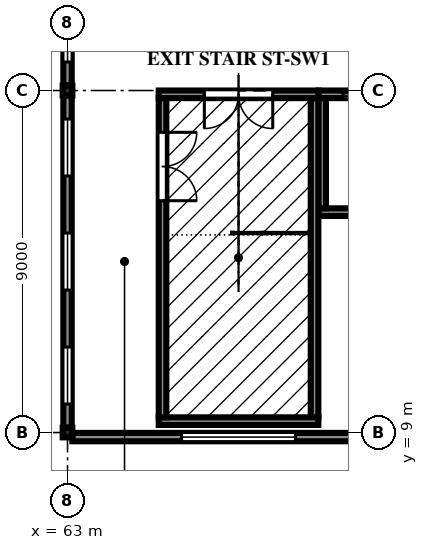
"""IFC4 building model, lengths in metres.
Left out: names, types, materials, properties, quantities, classifications, styles, units other than length and angle.
Written with IfcOpenShell. Run it as: python <this file> out.ifc"""

import sys

from ifc_helpers import new_model, si_unit, direction, frame, frame_2d, origin, origin_2d, place, context, subcontext, project, spatial, polyline, rectangle, i_section, outline, extrude, element, fill, save


model = new_model("IFC4")
c1 = context("Model", 3, precision=1e-05, world=origin(), true_north=direction((0.0, 1.0)))
c2 = subcontext(c1, "Body", "Model", "MODEL_VIEW")
j1 = project(units=[si_unit("LENGTHUNIT", "METRE"), si_unit("PLANEANGLEUNIT", "RADIAN")], contexts=[c1])
p1 = place(None, origin())
s1 = spatial("IfcSite", under=j1, at=p1, CompositionType="ELEMENT")
p2 = place(p1, origin())
s2 = spatial("IfcBuilding", under=s1, at=p2, CompositionType="ELEMENT")
p3 = place(p2, frame((0.0, 0.0, 7.5)))
s3 = spatial("IfcBuildingStorey", under=s2, at=p3, CompositionType="ELEMENT", Elevation=7.5)
p4 = place(p3, frame((63.0, 9.0, 0.0), z_axis=(0.0, 0.0, 1.0), x_axis=(1.0, 0.0, 0.0)))
e1 = element("IfcColumn", 1, at=p4, inside=s3, PredefinedType="COLUMN", context=c2, shape_type="SweptSolid", body=[
    extrude(i_section(OverallWidth=0.255, OverallDepth=0.254, WebThickness=0.009, FlangeThickness=0.014, FilletRadius=0.013, at=origin_2d()), origin(), (0.0, 0.0, 1.0), 4.2),
])
p5 = place(p3, frame((63.0, 18.0, 0.0), z_axis=(0.0, 0.0, 1.0), x_axis=(1.0, 0.0, 0.0)))
e2 = element("IfcColumn", 2, at=p5, inside=s3, PredefinedType="COLUMN", context=c2, shape_type="SweptSolid", body=[
    extrude(i_section(OverallWidth=0.256, OverallDepth=0.26, WebThickness=0.01, FlangeThickness=0.017, FilletRadius=0.013, at=origin_2d()), origin(), (0.0, 0.0, 1.0), 4.2),
])
p6 = place(p3, frame((63.127, 8.88, -0.13), z_axis=(0.0, 0.0, 1.0), x_axis=(1.0, 0.0, 0.0)))
e3 = element("IfcWall", 3, at=p6, inside=s3, PredefinedType="SOLIDWALL", context=c2, shape_type="SweptSolid", body=[
    extrude(rectangle(XDim=8.746, YDim=0.22, at=frame_2d((4.373, 0.0))), origin(), (0.0, 0.0, 1.0), 3.727),
])
p7 = place(p6, frame((2.873, 0.0, 1.03)))
e4 = element("IfcOpeningElement", 4, at=p7, cuts=e3, PredefinedType="OPENING", context=c2, shape_type="SweptSolid", body=[
    extrude(rectangle(XDim=3.0, YDim=2.1, at=frame_2d((1.5, 1.05))), frame((0.0, 0.12, 0.0), z_axis=(0.0, -1.0, 0.0), x_axis=(1.0, 0.0, 0.0)), (0.0, 0.0, 1.0), 0.24),
])
p8 = place(p3, frame((63.0, 9.127, 0.0), z_axis=(0.0, 0.0, 1.0), x_axis=(0.0, 1.0, 0.0)))
e5 = element("IfcWall", 5, at=p8, inside=s3, PredefinedType="SOLIDWALL", context=c2, shape_type="SweptSolid", body=[
    extrude(rectangle(XDim=8.743, YDim=0.22, at=frame_2d((4.372, 0.0))), origin(), (0.0, 0.0, 1.0), 3.597),
])
p9 = place(p8, frame((0.623, 0.0, 0.9)))
e6 = element("IfcOpeningElement", 6, at=p9, cuts=e5, PredefinedType="OPENING", context=c2, shape_type="SweptSolid", body=[
    extrude(rectangle(XDim=1.5, YDim=2.4, at=frame_2d((0.75, 1.2))), frame((0.0, 0.12, 0.0), z_axis=(0.0, -1.0, 0.0), x_axis=(1.0, 0.0, 0.0)), (0.0, 0.0, 1.0), 0.24),
])
p10 = place(p8, frame((3.623, 0.0, 0.9)))
e7 = element("IfcOpeningElement", 7, at=p10, cuts=e5, PredefinedType="OPENING", context=c2, shape_type="SweptSolid", body=[
    extrude(rectangle(XDim=1.5, YDim=2.4, at=frame_2d((0.75, 1.2))), frame((0.0, 0.12, 0.0), z_axis=(0.0, -1.0, 0.0), x_axis=(1.0, 0.0, 0.0)), (0.0, 0.0, 1.0), 0.24),
])
p11 = place(p8, frame((6.623, 0.0, 0.9)))
e8 = element("IfcOpeningElement", 8, at=p11, cuts=e5, PredefinedType="OPENING", context=c2, shape_type="SweptSolid", body=[
    extrude(rectangle(XDim=1.5, YDim=2.4, at=frame_2d((0.75, 1.2))), frame((0.0, 0.12, 0.0), z_axis=(0.0, -1.0, 0.0), x_axis=(1.0, 0.0, 0.0)), (0.0, 0.0, 1.0), 0.24),
])
p12 = place(p3, frame((63.0, 18.13, 0.0), z_axis=(0.0, 0.0, 1.0), x_axis=(0.0, 1.0, 0.0)))
e9 = element("IfcWall", 9, at=p12, inside=s3, PredefinedType="SOLIDWALL", context=c2, shape_type="SweptSolid", body=[
    extrude(rectangle(XDim=8.74, YDim=0.22, at=frame_2d((4.37, 0.0))), origin(), (0.0, 0.0, 1.0), 3.597),
])
p13 = place(p12, frame((0.62, 0.0, 0.9)))
e10 = element("IfcOpeningElement", 10, at=p13, cuts=e9, PredefinedType="OPENING", context=c2, shape_type="SweptSolid", body=[
    extrude(rectangle(XDim=1.5, YDim=2.4, at=frame_2d((0.75, 1.2))), frame((0.0, 0.12, 0.0), z_axis=(0.0, -1.0, 0.0), x_axis=(1.0, 0.0, 0.0)), (0.0, 0.0, 1.0), 0.24),
])
p14 = place(p12, frame((3.62, 0.0, 0.9)))
e11 = element("IfcOpeningElement", 11, at=p14, cuts=e9, PredefinedType="OPENING", context=c2, shape_type="SweptSolid", body=[
    extrude(rectangle(XDim=1.5, YDim=2.4, at=frame_2d((0.75, 1.2))), frame((0.0, 0.12, 0.0), z_axis=(0.0, -1.0, 0.0), x_axis=(1.0, 0.0, 0.0)), (0.0, 0.0, 1.0), 0.24),
])
p15 = place(p12, frame((6.62, 0.0, 0.9)))
e12 = element("IfcOpeningElement", 12, at=p15, cuts=e9, PredefinedType="OPENING", context=c2, shape_type="SweptSolid", body=[
    extrude(rectangle(XDim=1.5, YDim=2.4, at=frame_2d((0.75, 1.2))), frame((0.0, 0.12, 0.0), z_axis=(0.0, -1.0, 0.0), x_axis=(1.0, 0.0, 0.0)), (0.0, 0.0, 1.0), 0.24),
])
p16 = place(p3, frame((65.4, 9.3, 0.0), z_axis=(0.0, 0.0, 1.0), x_axis=(1.0, 0.0, 0.0)))
e13 = element("IfcWall", 13, at=p16, inside=s3, PredefinedType="SOLIDWALL", context=c2, shape_type="SweptSolid", body=[
    extrude(rectangle(XDim=4.2, YDim=0.2, at=frame_2d((2.1, 0.0))), origin(), (0.0, 0.0, 1.0), 3.59),
])
p17 = place(p3, frame((65.4, 17.9, -0.13), z_axis=(0.0, 0.0, 1.0), x_axis=(1.0, 0.0, 0.0)))
e14 = element("IfcWall", 14, at=p17, inside=s3, PredefinedType="SOLIDWALL", context=c2, shape_type="SweptSolid", body=[
    extrude(rectangle(XDim=4.2, YDim=0.2, at=frame_2d((2.1, 0.0))), origin(), (0.0, 0.0, 1.0), 3.72),
])
p18 = place(p17, frame((1.2, 0.0, 0.13)))
e15 = element("IfcOpeningElement", 15, at=p18, cuts=e14, PredefinedType="OPENING", context=c2, shape_type="SweptSolid", body=[
    extrude(rectangle(XDim=1.8, YDim=2.1, at=frame_2d((0.9, 1.05))), frame((0.0, 0.11, 0.0), z_axis=(0.0, -1.0, 0.0), x_axis=(1.0, 0.0, 0.0)), (0.0, 0.0, 1.0), 0.22),
])
p19 = place(p3, frame((65.5, 9.4, -0.13), z_axis=(0.0, 0.0, 1.0), x_axis=(0.0, 1.0, 0.0)))
e16 = element("IfcWall", 16, at=p19, inside=s3, PredefinedType="SOLIDWALL", context=c2, shape_type="SweptSolid", body=[
    extrude(rectangle(XDim=8.4, YDim=0.2, at=frame_2d((4.2, 0.0))), origin(), (0.0, 0.0, 1.0), 3.72),
])
p20 = place(p19, frame((5.7, 0.0, 0.13)))
e17 = element("IfcOpeningElement", 17, at=p20, cuts=e16, PredefinedType="OPENING", context=c2, shape_type="SweptSolid", body=[
    extrude(rectangle(XDim=1.8, YDim=2.1, at=frame_2d((0.9, 1.05))), frame((0.0, 0.11, 0.0), z_axis=(0.0, -1.0, 0.0), x_axis=(1.0, 0.0, 0.0)), (0.0, 0.0, 1.0), 0.22),
])
p21 = place(p3, frame((69.5, 9.4, -0.13), z_axis=(0.0, 0.0, 1.0), x_axis=(0.0, 1.0, 0.0)))
e18 = element("IfcWall", 18, at=p21, inside=s3, PredefinedType="SOLIDWALL", context=c2, shape_type="SweptSolid", body=[
    extrude(rectangle(XDim=8.4, YDim=0.2, at=frame_2d((4.2, 0.0))), origin(), (0.0, 0.0, 1.0), 3.72),
])
p22 = place(p3, frame((69.602, 14.8, 0.0), z_axis=(0.0, 0.0, 1.0), x_axis=(1.0, 0.0, 0.0)))
e19 = element("IfcWall", 19, at=p22, inside=s3, PredefinedType="SOLIDWALL", context=c2, shape_type="SweptSolid", body=[
    extrude(rectangle(XDim=2.398, YDim=0.2, at=frame_2d((1.199, 0.0))), origin(), (0.0, 0.0, 1.0), 3.516),
])
p23 = place(p3, frame((69.602, 17.9, 0.0), z_axis=(0.0, 0.0, 1.0), x_axis=(1.0, 0.0, 0.0)))
e20 = element("IfcWall", 20, at=p23, inside=s3, PredefinedType="SOLIDWALL", context=c2, shape_type="SweptSolid", body=[
    extrude(rectangle(XDim=2.398, YDim=0.2, at=frame_2d((1.199, 0.0))), origin(), (0.0, 0.0, 1.0), 3.516),
])
p24 = place(p23, frame((0.648, 0.0, 0.0)))
e21 = element("IfcOpeningElement", 21, at=p24, cuts=e20, PredefinedType="OPENING", context=c2, shape_type="SweptSolid", body=[
    extrude(rectangle(XDim=1.1, YDim=2.1, at=frame_2d((0.55, 1.05))), frame((0.0, 0.11, 0.0), z_axis=(0.0, -1.0, 0.0), x_axis=(1.0, 0.0, 0.0)), (0.0, 0.0, 1.0), 0.22),
])
p25 = place(p3, frame((69.7, 14.9, 0.0), z_axis=(0.0, 0.0, 1.0), x_axis=(0.0, 1.0, 0.0)))
e22 = element("IfcWall", 22, at=p25, inside=s3, PredefinedType="SOLIDWALL", context=c2, shape_type="SweptSolid", body=[
    extrude(rectangle(XDim=2.9, YDim=0.2, at=frame_2d((1.45, 0.0))), origin(), (0.0, 0.0, 1.0), 3.516),
])
p26 = place(p7, origin())
e23 = element("IfcWindow", 23, at=p26, inside=s3, PartitioningType="TRIPLE_PANEL_VERTICAL", PredefinedType="WINDOW", context=c2, shape_type="SweptSolid", body=[
    extrude(outline(polyline([(0.0, 0.0), (3.0, 0.0), (3.0, 2.1), (0.0, 2.1), (0.0, 0.0)]), holes=[polyline([(0.07, 0.07), (2.93, 0.07), (2.93, 2.03), (0.07, 2.03), (0.07, 0.07)])]), frame((0.0, 0.03, 0.0), z_axis=(0.0, -1.0, 0.0), x_axis=(1.0, 0.0, 0.0)), (0.0, 0.0, 1.0), 0.06),
    extrude(rectangle(XDim=0.04, YDim=1.96, at=frame_2d((1.017, 1.05))), frame((0.0, 0.022, 0.0), z_axis=(0.0, -1.0, 0.0), x_axis=(1.0, 0.0, 0.0)), (0.0, 0.0, 1.0), 0.044),
    extrude(rectangle(XDim=0.04, YDim=1.96, at=frame_2d((1.983, 1.05))), frame((0.0, 0.022, 0.0), z_axis=(0.0, -1.0, 0.0), x_axis=(1.0, 0.0, 0.0)), (0.0, 0.0, 1.0), 0.044),
    extrude(outline(polyline([(0.07, 0.07), (0.997, 0.07), (0.997, 2.03), (0.07, 2.03), (0.07, 0.07)]), holes=[polyline([(0.1, 0.1), (0.967, 0.1), (0.967, 2.0), (0.1, 2.0), (0.1, 0.1)])]), frame((0.0, 0.022, 0.0), z_axis=(0.0, -1.0, 0.0), x_axis=(1.0, 0.0, 0.0)), (0.0, 0.0, 1.0), 0.045),
    extrude(rectangle(XDim=0.866, YDim=1.9, at=frame_2d((0.533, 1.05))), frame((0.0, 0.006, 0.0), z_axis=(0.0, -1.0, 0.0), x_axis=(1.0, 0.0, 0.0)), (0.0, 0.0, 1.0), 0.012),
    extrude(outline(polyline([(1.037, 0.07), (1.963, 0.07), (1.963, 2.03), (1.037, 2.03), (1.037, 0.07)]), holes=[polyline([(1.067, 0.1), (1.933, 0.1), (1.933, 2.0), (1.067, 2.0), (1.067, 0.1)])]), frame((0.0, 0.022, 0.0), z_axis=(0.0, -1.0, 0.0), x_axis=(1.0, 0.0, 0.0)), (0.0, 0.0, 1.0), 0.045),
    extrude(rectangle(XDim=0.867, YDim=1.9, at=frame_2d((1.5, 1.05))), frame((0.0, 0.006, 0.0), z_axis=(0.0, -1.0, 0.0), x_axis=(1.0, 0.0, 0.0)), (0.0, 0.0, 1.0), 0.012),
    extrude(outline(polyline([(2.003, 0.07), (2.93, 0.07), (2.93, 2.03), (2.003, 2.03), (2.003, 0.07)]), holes=[polyline([(2.033, 0.1), (2.9, 0.1), (2.9, 2.0), (2.033, 2.0), (2.033, 0.1)])]), frame((0.0, 0.022, 0.0), z_axis=(0.0, -1.0, 0.0), x_axis=(1.0, 0.0, 0.0)), (0.0, 0.0, 1.0), 0.045),
    extrude(rectangle(XDim=0.866, YDim=1.9, at=frame_2d((2.467, 1.05))), frame((0.0, 0.006, 0.0), z_axis=(0.0, -1.0, 0.0), x_axis=(1.0, 0.0, 0.0)), (0.0, 0.0, 1.0), 0.012),
])
fill(e4, e23)
p27 = place(p9, origin())
e24 = element("IfcWindow", 24, at=p27, inside=s3, PartitioningType="DOUBLE_PANEL_VERTICAL", PredefinedType="WINDOW", context=c2, shape_type="SweptSolid", body=[
    extrude(outline(polyline([(0.0, 0.0), (1.5, 0.0), (1.5, 2.4), (0.0, 2.4), (0.0, 0.0)]), holes=[polyline([(0.07, 0.07), (1.43, 0.07), (1.43, 2.33), (0.07, 2.33), (0.07, 0.07)])]), frame((0.0, 0.03, 0.0), z_axis=(0.0, -1.0, 0.0), x_axis=(1.0, 0.0, 0.0)), (0.0, 0.0, 1.0), 0.06),
    extrude(rectangle(XDim=0.04, YDim=2.26, at=frame_2d((0.75, 1.2))), frame((0.0, 0.022, 0.0), z_axis=(0.0, -1.0, 0.0), x_axis=(1.0, 0.0, 0.0)), (0.0, 0.0, 1.0), 0.044),
    extrude(outline(polyline([(0.07, 0.07), (0.73, 0.07), (0.73, 2.33), (0.07, 2.33), (0.07, 0.07)]), holes=[polyline([(0.1, 0.1), (0.7, 0.1), (0.7, 2.3), (0.1, 2.3), (0.1, 0.1)])]), frame((0.0, 0.022, 0.0), z_axis=(0.0, -1.0, 0.0), x_axis=(1.0, 0.0, 0.0)), (0.0, 0.0, 1.0), 0.045),
    extrude(rectangle(XDim=0.6, YDim=2.2, at=frame_2d((0.4, 1.2))), frame((0.0, 0.006, 0.0), z_axis=(0.0, -1.0, 0.0), x_axis=(1.0, 0.0, 0.0)), (0.0, 0.0, 1.0), 0.012),
    extrude(outline(polyline([(0.77, 0.07), (1.43, 0.07), (1.43, 2.33), (0.77, 2.33), (0.77, 0.07)]), holes=[polyline([(0.8, 0.1), (1.4, 0.1), (1.4, 2.3), (0.8, 2.3), (0.8, 0.1)])]), frame((0.0, 0.022, 0.0), z_axis=(0.0, -1.0, 0.0), x_axis=(1.0, 0.0, 0.0)), (0.0, 0.0, 1.0), 0.045),
    extrude(rectangle(XDim=0.6, YDim=2.2, at=frame_2d((1.1, 1.2))), frame((0.0, 0.006, 0.0), z_axis=(0.0, -1.0, 0.0), x_axis=(1.0, 0.0, 0.0)), (0.0, 0.0, 1.0), 0.012),
])
fill(e6, e24)
p28 = place(p10, origin())
e25 = element("IfcWindow", 25, at=p28, inside=s3, PartitioningType="DOUBLE_PANEL_VERTICAL", PredefinedType="WINDOW", context=c2, shape_type="SweptSolid", body=[
    extrude(outline(polyline([(0.0, 0.0), (1.5, 0.0), (1.5, 2.4), (0.0, 2.4), (0.0, 0.0)]), holes=[polyline([(0.07, 0.07), (1.43, 0.07), (1.43, 2.33), (0.07, 2.33), (0.07, 0.07)])]), frame((0.0, 0.03, 0.0), z_axis=(0.0, -1.0, 0.0), x_axis=(1.0, 0.0, 0.0)), (0.0, 0.0, 1.0), 0.06),
    extrude(rectangle(XDim=0.04, YDim=2.26, at=frame_2d((0.75, 1.2))), frame((0.0, 0.022, 0.0), z_axis=(0.0, -1.0, 0.0), x_axis=(1.0, 0.0, 0.0)), (0.0, 0.0, 1.0), 0.044),
    extrude(outline(polyline([(0.07, 0.07), (0.73, 0.07), (0.73, 2.33), (0.07, 2.33), (0.07, 0.07)]), holes=[polyline([(0.1, 0.1), (0.7, 0.1), (0.7, 2.3), (0.1, 2.3), (0.1, 0.1)])]), frame((0.0, 0.022, 0.0), z_axis=(0.0, -1.0, 0.0), x_axis=(1.0, 0.0, 0.0)), (0.0, 0.0, 1.0), 0.045),
    extrude(rectangle(XDim=0.6, YDim=2.2, at=frame_2d((0.4, 1.2))), frame((0.0, 0.006, 0.0), z_axis=(0.0, -1.0, 0.0), x_axis=(1.0, 0.0, 0.0)), (0.0, 0.0, 1.0), 0.012),
    extrude(outline(polyline([(0.77, 0.07), (1.43, 0.07), (1.43, 2.33), (0.77, 2.33), (0.77, 0.07)]), holes=[polyline([(0.8, 0.1), (1.4, 0.1), (1.4, 2.3), (0.8, 2.3), (0.8, 0.1)])]), frame((0.0, 0.022, 0.0), z_axis=(0.0, -1.0, 0.0), x_axis=(1.0, 0.0, 0.0)), (0.0, 0.0, 1.0), 0.045),
    extrude(rectangle(XDim=0.6, YDim=2.2, at=frame_2d((1.1, 1.2))), frame((0.0, 0.006, 0.0), z_axis=(0.0, -1.0, 0.0), x_axis=(1.0, 0.0, 0.0)), (0.0, 0.0, 1.0), 0.012),
])
fill(e7, e25)
p29 = place(p11, origin())
e26 = element("IfcWindow", 26, at=p29, inside=s3, PartitioningType="DOUBLE_PANEL_VERTICAL", PredefinedType="WINDOW", context=c2, shape_type="SweptSolid", body=[
    extrude(outline(polyline([(0.0, 0.0), (1.5, 0.0), (1.5, 2.4), (0.0, 2.4), (0.0, 0.0)]), holes=[polyline([(0.07, 0.07), (1.43, 0.07), (1.43, 2.33), (0.07, 2.33), (0.07, 0.07)])]), frame((0.0, 0.03, 0.0), z_axis=(0.0, -1.0, 0.0), x_axis=(1.0, 0.0, 0.0)), (0.0, 0.0, 1.0), 0.06),
    extrude(rectangle(XDim=0.04, YDim=2.26, at=frame_2d((0.75, 1.2))), frame((0.0, 0.022, 0.0), z_axis=(0.0, -1.0, 0.0), x_axis=(1.0, 0.0, 0.0)), (0.0, 0.0, 1.0), 0.044),
    extrude(outline(polyline([(0.07, 0.07), (0.73, 0.07), (0.73, 2.33), (0.07, 2.33), (0.07, 0.07)]), holes=[polyline([(0.1, 0.1), (0.7, 0.1), (0.7, 2.3), (0.1, 2.3), (0.1, 0.1)])]), frame((0.0, 0.022, 0.0), z_axis=(0.0, -1.0, 0.0), x_axis=(1.0, 0.0, 0.0)), (0.0, 0.0, 1.0), 0.045),
    extrude(rectangle(XDim=0.6, YDim=2.2, at=frame_2d((0.4, 1.2))), frame((0.0, 0.006, 0.0), z_axis=(0.0, -1.0, 0.0), x_axis=(1.0, 0.0, 0.0)), (0.0, 0.0, 1.0), 0.012),
    extrude(outline(polyline([(0.77, 0.07), (1.43, 0.07), (1.43, 2.33), (0.77, 2.33), (0.77, 0.07)]), holes=[polyline([(0.8, 0.1), (1.4, 0.1), (1.4, 2.3), (0.8, 2.3), (0.8, 0.1)])]), frame((0.0, 0.022, 0.0), z_axis=(0.0, -1.0, 0.0), x_axis=(1.0, 0.0, 0.0)), (0.0, 0.0, 1.0), 0.045),
    extrude(rectangle(XDim=0.6, YDim=2.2, at=frame_2d((1.1, 1.2))), frame((0.0, 0.006, 0.0), z_axis=(0.0, -1.0, 0.0), x_axis=(1.0, 0.0, 0.0)), (0.0, 0.0, 1.0), 0.012),
])
fill(e8, e26)
p30 = place(p13, origin())
e27 = element("IfcWindow", 27, at=p30, inside=s3, PartitioningType="DOUBLE_PANEL_VERTICAL", PredefinedType="WINDOW", context=c2, shape_type="SweptSolid", body=[
    extrude(outline(polyline([(0.0, 0.0), (1.5, 0.0), (1.5, 2.4), (0.0, 2.4), (0.0, 0.0)]), holes=[polyline([(0.07, 0.07), (1.43, 0.07), (1.43, 2.33), (0.07, 2.33), (0.07, 0.07)])]), frame((0.0, 0.03, 0.0), z_axis=(0.0, -1.0, 0.0), x_axis=(1.0, 0.0, 0.0)), (0.0, 0.0, 1.0), 0.06),
    extrude(rectangle(XDim=0.04, YDim=2.26, at=frame_2d((0.75, 1.2))), frame((0.0, 0.022, 0.0), z_axis=(0.0, -1.0, 0.0), x_axis=(1.0, 0.0, 0.0)), (0.0, 0.0, 1.0), 0.044),
    extrude(outline(polyline([(0.07, 0.07), (0.73, 0.07), (0.73, 2.33), (0.07, 2.33), (0.07, 0.07)]), holes=[polyline([(0.1, 0.1), (0.7, 0.1), (0.7, 2.3), (0.1, 2.3), (0.1, 0.1)])]), frame((0.0, 0.022, 0.0), z_axis=(0.0, -1.0, 0.0), x_axis=(1.0, 0.0, 0.0)), (0.0, 0.0, 1.0), 0.045),
    extrude(rectangle(XDim=0.6, YDim=2.2, at=frame_2d((0.4, 1.2))), frame((0.0, 0.006, 0.0), z_axis=(0.0, -1.0, 0.0), x_axis=(1.0, 0.0, 0.0)), (0.0, 0.0, 1.0), 0.012),
    extrude(outline(polyline([(0.77, 0.07), (1.43, 0.07), (1.43, 2.33), (0.77, 2.33), (0.77, 0.07)]), holes=[polyline([(0.8, 0.1), (1.4, 0.1), (1.4, 2.3), (0.8, 2.3), (0.8, 0.1)])]), frame((0.0, 0.022, 0.0), z_axis=(0.0, -1.0, 0.0), x_axis=(1.0, 0.0, 0.0)), (0.0, 0.0, 1.0), 0.045),
    extrude(rectangle(XDim=0.6, YDim=2.2, at=frame_2d((1.1, 1.2))), frame((0.0, 0.006, 0.0), z_axis=(0.0, -1.0, 0.0), x_axis=(1.0, 0.0, 0.0)), (0.0, 0.0, 1.0), 0.012),
])
fill(e10, e27)
p31 = place(p24, origin())
e28 = element("IfcDoor", 28, at=p31, inside=s3, OperationType="SLIDING_TO_LEFT", PredefinedType="DOOR", context=c2, shape_type="SweptSolid", body=[
    extrude(outline(polyline([(0.0, 0.0), (0.07, 0.0), (0.07, 2.03), (1.03, 2.03), (1.03, 0.0), (1.1, 0.0), (1.1, 2.1), (0.0, 2.1), (0.0, 0.0)])), frame((0.0, 0.025, 0.0), z_axis=(0.0, -1.0, 0.0), x_axis=(1.0, 0.0, 0.0)), (0.0, 0.0, 1.0), 0.05),
    extrude(rectangle(XDim=0.524, YDim=2.016, at=frame_2d((0.336, 1.018))), frame((0.0, 0.018, 0.0), z_axis=(0.0, -1.0, 0.0), x_axis=(1.0, 0.0, 0.0)), (0.0, 0.0, 1.0), 0.016),
    extrude(rectangle(XDim=0.52, YDim=2.016, at=frame_2d((0.766, 1.018))), frame((0.0, -0.002, 0.0), z_axis=(0.0, -1.0, 0.0), x_axis=(1.0, 0.0, 0.0)), (0.0, 0.0, 1.0), 0.016),
])
fill(e21, e28)
p32 = place(p20, frame((1.8, 0.0, 0.0), z_axis=(0.0, 0.0, 1.0), x_axis=(-1.0, 0.0, 0.0)))
e29 = element("IfcDoor", 29, at=p32, inside=s3, OperationType="DOUBLE_DOOR_SINGLE_SWING", PredefinedType="DOOR", context=c2, shape_type="SweptSolid", body=[
    extrude(outline(polyline([(0.0, 0.0), (0.07, 0.0), (0.07, 2.03), (1.73, 2.03), (1.73, 0.0), (1.8, 0.0), (1.8, 2.1), (0.0, 2.1), (0.0, 0.0)])), frame((0.0, 0.025, 0.0), z_axis=(0.0, -1.0, 0.0), x_axis=(1.0, 0.0, 0.0)), (0.0, 0.0, 1.0), 0.05),
    extrude(outline(polyline([(0.074, 0.01), (0.897, 0.01), (0.897, 2.026), (0.074, 2.026), (0.074, 0.01)]), holes=[polyline([(0.194, 0.16), (0.777, 0.16), (0.777, 1.01), (0.194, 1.01), (0.194, 0.16)]), polyline([(0.335, 1.16), (0.635, 1.16), (0.635, 1.76), (0.335, 1.76), (0.335, 1.16)])]), frame((0.0, 0.017, 0.0), z_axis=(0.0, -1.0, 0.0), x_axis=(1.0, 0.0, 0.0)), (0.0, 0.0, 1.0), 0.035),
    extrude(rectangle(XDim=0.583, YDim=0.85, at=frame_2d((0.485, 0.585))), frame((0.0, 0.009, 0.0), z_axis=(0.0, -1.0, 0.0), x_axis=(1.0, 0.0, 0.0)), (0.0, 0.0, 1.0), 0.017),
    extrude(rectangle(XDim=0.3, YDim=0.6, at=frame_2d((0.485, 1.46))), frame((0.0, 0.006, 0.0), z_axis=(0.0, -1.0, 0.0), x_axis=(1.0, 0.0, 0.0)), (0.0, 0.0, 1.0), 0.012),
    extrude(outline(polyline([(0.903, 0.01), (1.726, 0.01), (1.726, 2.026), (0.903, 2.026), (0.903, 0.01)]), holes=[polyline([(1.023, 0.16), (1.606, 0.16), (1.606, 1.01), (1.023, 1.01), (1.023, 0.16)]), polyline([(1.165, 1.16), (1.465, 1.16), (1.465, 1.76), (1.165, 1.76), (1.165, 1.16)])]), frame((0.0, 0.017, 0.0), z_axis=(0.0, -1.0, 0.0), x_axis=(1.0, 0.0, 0.0)), (0.0, 0.0, 1.0), 0.035),
    extrude(rectangle(XDim=0.583, YDim=0.85, at=frame_2d((1.314, 0.585))), frame((0.0, 0.009, 0.0), z_axis=(0.0, -1.0, 0.0), x_axis=(1.0, 0.0, 0.0)), (0.0, 0.0, 1.0), 0.017),
    extrude(rectangle(XDim=0.3, YDim=0.6, at=frame_2d((1.314, 1.46))), frame((0.0, 0.006, 0.0), z_axis=(0.0, -1.0, 0.0), x_axis=(1.0, 0.0, 0.0)), (0.0, 0.0, 1.0), 0.012),
])
fill(e17, e29)
p33 = place(p18, frame((1.8, 0.0, 0.0), z_axis=(0.0, 0.0, 1.0), x_axis=(-1.0, 0.0, 0.0)))
e30 = element("IfcDoor", 30, at=p33, inside=s3, OperationType="DOUBLE_DOOR_SINGLE_SWING", PredefinedType="DOOR", context=c2, shape_type="SweptSolid", body=[
    extrude(outline(polyline([(0.0, 0.0), (0.07, 0.0), (0.07, 2.03), (1.73, 2.03), (1.73, 0.0), (1.8, 0.0), (1.8, 2.1), (0.0, 2.1), (0.0, 0.0)])), frame((0.0, 0.025, 0.0), z_axis=(0.0, -1.0, 0.0), x_axis=(1.0, 0.0, 0.0)), (0.0, 0.0, 1.0), 0.05),
    extrude(outline(polyline([(0.074, 0.01), (0.897, 0.01), (0.897, 2.026), (0.074, 2.026), (0.074, 0.01)]), holes=[polyline([(0.194, 0.16), (0.777, 0.16), (0.777, 1.01), (0.194, 1.01), (0.194, 0.16)]), polyline([(0.335, 1.16), (0.635, 1.16), (0.635, 1.76), (0.335, 1.76), (0.335, 1.16)])]), frame((0.0, 0.017, 0.0), z_axis=(0.0, -1.0, 0.0), x_axis=(1.0, 0.0, 0.0)), (0.0, 0.0, 1.0), 0.035),
    extrude(rectangle(XDim=0.583, YDim=0.85, at=frame_2d((0.485, 0.585))), frame((0.0, 0.009, 0.0), z_axis=(0.0, -1.0, 0.0), x_axis=(1.0, 0.0, 0.0)), (0.0, 0.0, 1.0), 0.017),
    extrude(rectangle(XDim=0.3, YDim=0.6, at=frame_2d((0.485, 1.46))), frame((0.0, 0.006, 0.0), z_axis=(0.0, -1.0, 0.0), x_axis=(1.0, 0.0, 0.0)), (0.0, 0.0, 1.0), 0.012),
    extrude(outline(polyline([(0.903, 0.01), (1.726, 0.01), (1.726, 2.026), (0.903, 2.026), (0.903, 0.01)]), holes=[polyline([(1.023, 0.16), (1.606, 0.16), (1.606, 1.01), (1.023, 1.01), (1.023, 0.16)]), polyline([(1.165, 1.16), (1.465, 1.16), (1.465, 1.76), (1.165, 1.76), (1.165, 1.16)])]), frame((0.0, 0.017, 0.0), z_axis=(0.0, -1.0, 0.0), x_axis=(1.0, 0.0, 0.0)), (0.0, 0.0, 1.0), 0.035),
    extrude(rectangle(XDim=0.583, YDim=0.85, at=frame_2d((1.314, 0.585))), frame((0.0, 0.009, 0.0), z_axis=(0.0, -1.0, 0.0), x_axis=(1.0, 0.0, 0.0)), (0.0, 0.0, 1.0), 0.017),
    extrude(rectangle(XDim=0.3, YDim=0.6, at=frame_2d((1.314, 1.46))), frame((0.0, 0.006, 0.0), z_axis=(0.0, -1.0, 0.0), x_axis=(1.0, 0.0, 0.0)), (0.0, 0.0, 1.0), 0.012),
])
fill(e15, e30)
save(model, sys.argv[1])
